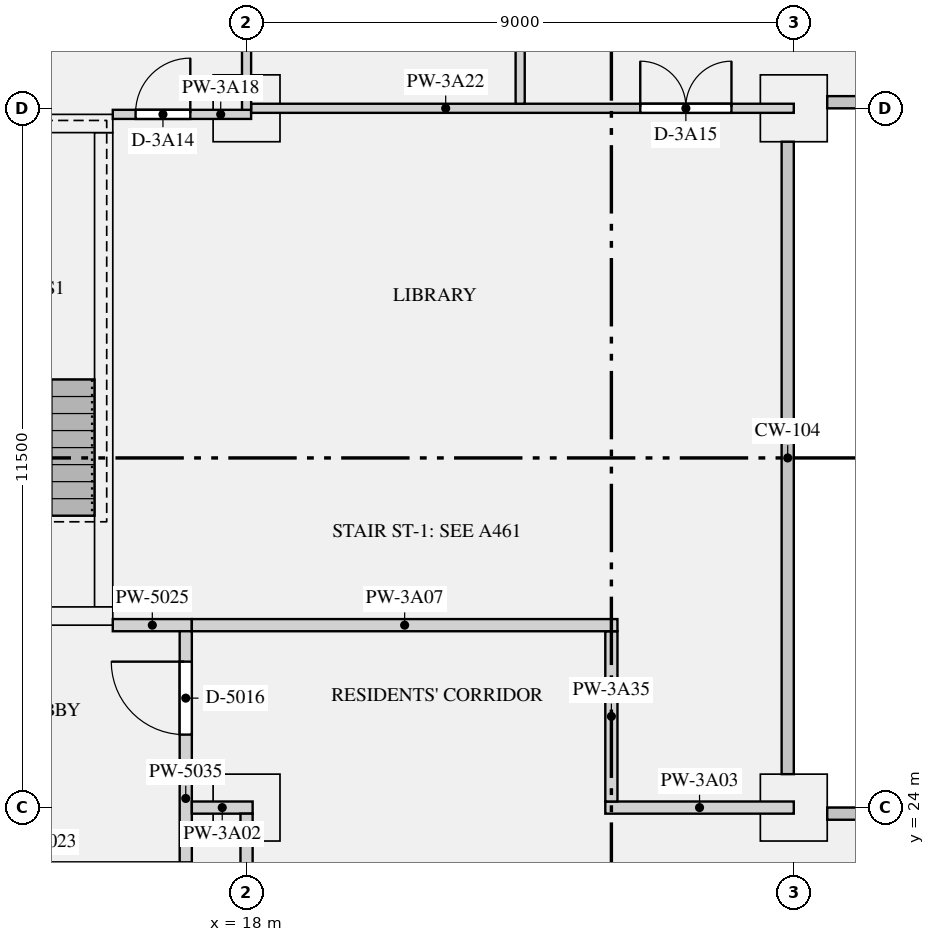
"""IFC4 building model, lengths in metres.
Left out: names, types, materials, properties, quantities, classifications, styles, units other than length and angle.
Written with IfcOpenShell. Run it as: python <this file> out.ifc"""

import sys

from ifc_helpers import new_model, si_unit, direction, frame, frame_2d, origin, origin_2d, place, context, subcontext, project, spatial, rectangle, extrude, element, fill, save


model = new_model("IFC4")
c1 = context("Model", 3, precision=1e-05, world=origin(), true_north=direction((0.0, 1.0)))
c2 = subcontext(c1, "Body", "Model", "MODEL_VIEW")
j1 = project(units=[si_unit("LENGTHUNIT", "METRE"), si_unit("PLANEANGLEUNIT", "RADIAN")], contexts=[c1])
p1 = place(None, origin())
s1 = spatial("IfcSite", under=j1, at=p1, CompositionType="ELEMENT")
p2 = place(p1, origin())
s2 = spatial("IfcBuilding", under=s1, at=p2, CompositionType="ELEMENT")
p3 = place(p2, frame((0.0, 0.0, 141.3)))
s3 = spatial("IfcBuildingStorey", under=s2, at=p3, CompositionType="ELEMENT", Elevation=141.3)
for number, where, z_axis, x_axis in (
    (1, (18.0, 24.0, 0.0), (0.0, 0.0, 1.0), (1.0, 0.0, 0.0)),
    (2, (27.0, 24.0, 0.0), (0.0, 0.0, 1.0), (1.0, 0.0, 0.0)),
    (3, (18.0, 35.5, 0.0), (0.0, 0.0, 1.0), (1.0, 0.0, 0.0)),
    (4, (27.0, 35.5, 0.0), (0.0, 0.0, 1.0), (1.0, 0.0, 0.0)),
):
    element("IfcColumn", number, at=place(p3, frame(where, z_axis=z_axis, x_axis=x_axis)), inside=s3, PredefinedType="COLUMN", context=c2, shape_type="SweptSolid", body=[
        extrude(rectangle(XDim=1.1, YDim=1.1, at=origin_2d()), origin(), (0.0, 0.0, 1.0), 3.15),
    ])
p4 = place(p3, frame((12.2, 27.15, 0.0), z_axis=(0.0, 0.0, 1.0), x_axis=(1.0, 0.0, 0.0)))
e5 = element("IfcWall", 5, at=p4, inside=s3, PredefinedType="SHEAR", context=c2, shape_type="SweptSolid", body=[
    extrude(rectangle(XDim=3.6, YDim=0.3, at=frame_2d((1.8, 0.0))), origin(), (0.0, 0.0, 1.0), 3.15),
])
p5 = place(p4, frame((1.25, 0.0, 0.0)))
e6 = element("IfcOpeningElement", 6, at=p5, cuts=e5, PredefinedType="OPENING", context=c2, shape_type="SweptSolid", body=[
    extrude(rectangle(XDim=1.1, YDim=2.1, at=frame_2d((0.55, 1.05))), frame((0.0, 0.16, 0.0), z_axis=(0.0, -1.0, 0.0), x_axis=(1.0, 0.0, 0.0)), (0.0, 0.0, 1.0), 0.32),
])
p6 = place(p3, frame((12.2, 35.25, 0.0), z_axis=(0.0, 0.0, 1.0), x_axis=(1.0, 0.0, 0.0)))
e7 = element("IfcWall", 7, at=p6, inside=s3, PredefinedType="SHEAR", context=c2, shape_type="SweptSolid", body=[
    extrude(rectangle(XDim=3.6, YDim=0.3, at=frame_2d((1.8, 0.0))), origin(), (0.0, 0.0, 1.0), 3.15),
])
p7 = place(p3, frame((15.65, 27.3, 0.0), z_axis=(0.0, 0.0, 1.0), x_axis=(0.0, 1.0, 0.0)))
e8 = element("IfcWall", 8, at=p7, inside=s3, PredefinedType="SHEAR", context=c2, shape_type="SweptSolid", body=[
    extrude(rectangle(XDim=7.8, YDim=0.3, at=frame_2d((3.9, 0.0))), origin(), (0.0, 0.0, 1.0), 3.15),
])
p8 = place(p3, frame((15.8, 27.0, 0.0), z_axis=(0.0, 0.0, 1.0), x_axis=(1.0, 0.0, 0.0)))
e9 = element("IfcWall", 9, at=p8, inside=s3, PredefinedType="PARTITIONING", context=c2, shape_type="SweptSolid", body=[
    extrude(rectangle(XDim=1.3, YDim=0.2, at=frame_2d((0.65, 0.0))), origin(), (0.0, 0.0, 1.0), 2.83),
])
p9 = place(p3, frame((17.0, 23.1, 0.0), z_axis=(0.0, 0.0, 1.0), x_axis=(0.0, 1.0, 0.0)))
e10 = element("IfcWall", 10, at=p9, inside=s3, PredefinedType="PARTITIONING", context=c2, shape_type="SweptSolid", body=[
    extrude(rectangle(XDim=3.8, YDim=0.2, at=frame_2d((1.9, 0.0))), origin(), (0.0, 0.0, 1.0), 2.83),
])
p10 = place(p9, frame((2.1, 0.0, 0.0)))
e11 = element("IfcOpeningElement", 11, at=p10, cuts=e10, PredefinedType="OPENING", context=c2, shape_type="SweptSolid", body=[
    extrude(rectangle(XDim=1.2, YDim=2.1, at=frame_2d((0.6, 1.05))), frame((0.0, 0.11, 0.0), z_axis=(0.0, -1.0, 0.0), x_axis=(1.0, 0.0, 0.0)), (0.0, 0.0, 1.0), 0.22),
])
p11 = place(p3, frame((17.1, 24.0, 0.0), z_axis=(0.0, 0.0, 1.0), x_axis=(1.0, 0.0, 0.0)))
e12 = element("IfcWall", 12, at=p11, inside=s3, PredefinedType="PARTITIONING", context=c2, shape_type="SweptSolid", body=[
    extrude(rectangle(XDim=1.0, YDim=0.2, at=frame_2d((0.5, 0.0))), origin(), (0.0, 0.0, 1.0), 2.83),
])
p12 = place(p3, frame((23.9, 24.0, 0.0), z_axis=(0.0, 0.0, 1.0), x_axis=(1.0, 0.0, 0.0)))
e13 = element("IfcWall", 13, at=p12, inside=s3, PredefinedType="PARTITIONING", context=c2, shape_type="SweptSolid", body=[
    extrude(rectangle(XDim=3.1, YDim=0.2, at=frame_2d((1.55, 0.0))), origin(), (0.0, 0.0, 1.0), 2.83),
])
p13 = place(p3, frame((17.1, 27.0, 0.0), z_axis=(0.0, 0.0, 1.0), x_axis=(1.0, 0.0, 0.0)))
e14 = element("IfcWall", 14, at=p13, inside=s3, PredefinedType="PARTITIONING", context=c2, shape_type="SweptSolid", body=[
    extrude(rectangle(XDim=7.0, YDim=0.2, at=frame_2d((3.5, 0.0))), origin(), (0.0, 0.0, 1.0), 2.83),
])
p14 = place(p3, frame((15.8, 35.4, 0.0), z_axis=(0.0, 0.0, 1.0), x_axis=(1.0, 0.0, 0.0)))
e15 = element("IfcWall", 15, at=p14, inside=s3, PredefinedType="PARTITIONING", context=c2, shape_type="SweptSolid", body=[
    extrude(rectangle(XDim=2.275, YDim=0.15, at=frame_2d((1.137, 0.0))), origin(), (0.0, 0.0, 1.0), 2.83),
])
p15 = place(p14, frame((0.375, 0.0, 0.0)))
e16 = element("IfcOpeningElement", 16, at=p15, cuts=e15, PredefinedType="OPENING", context=c2, shape_type="SweptSolid", body=[
    extrude(rectangle(XDim=0.9, YDim=2.1, at=frame_2d((0.45, 1.05))), frame((0.0, 0.085, 0.0), z_axis=(0.0, -1.0, 0.0), x_axis=(1.0, 0.0, 0.0)), (0.0, 0.0, 1.0), 0.17),
])
p16 = place(p3, frame((18.075, 35.5, 0.0), z_axis=(0.0, 0.0, 1.0), x_axis=(1.0, 0.0, 0.0)))
e17 = element("IfcWall", 17, at=p16, inside=s3, PredefinedType="PARTITIONING", context=c2, shape_type="SweptSolid", body=[
    extrude(rectangle(XDim=8.925, YDim=0.15, at=frame_2d((4.462, 0.0))), origin(), (0.0, 0.0, 1.0), 2.83),
])
p17 = place(p16, frame((6.4, 0.0, 0.0)))
e18 = element("IfcOpeningElement", 18, at=p17, cuts=e17, PredefinedType="OPENING", context=c2, shape_type="SweptSolid", body=[
    extrude(rectangle(XDim=1.5, YDim=2.1, at=frame_2d((0.75, 1.05))), frame((0.0, 0.085, 0.0), z_axis=(0.0, -1.0, 0.0), x_axis=(1.0, 0.0, 0.0)), (0.0, 0.0, 1.0), 0.17),
])
p18 = place(p3, frame((18.0, 35.475, 0.0), z_axis=(0.0, 0.0, 1.0), x_axis=(0.0, 1.0, 0.0)))
e19 = element("IfcWall", 19, at=p18, inside=s3, PredefinedType="PARTITIONING", context=c2, shape_type="SweptSolid", body=[
    extrude(rectangle(XDim=7.325, YDim=0.15, at=frame_2d((3.663, 0.0))), origin(), (0.0, 0.0, 1.0), 2.83),
])
p19 = place(p18, frame((5.05, 0.0, 0.0)))
e20 = element("IfcOpeningElement", 20, at=p19, cuts=e19, PredefinedType="OPENING", context=c2, shape_type="SweptSolid", body=[
    extrude(rectangle(XDim=0.9, YDim=2.1, at=frame_2d((0.45, 1.05))), frame((0.0, 0.085, 0.0), z_axis=(0.0, -1.0, 0.0), x_axis=(1.0, 0.0, 0.0)), (0.0, 0.0, 1.0), 0.17),
])
p20 = place(p18, frame((1.6, 0.0, 0.0)))
e21 = element("IfcOpeningElement", 21, at=p20, cuts=e19, PredefinedType="OPENING", context=c2, shape_type="SweptSolid", body=[
    extrude(rectangle(XDim=0.9, YDim=2.1, at=frame_2d((0.45, 1.05))), frame((0.0, 0.085, 0.0), z_axis=(0.0, -1.0, 0.0), x_axis=(1.0, 0.0, 0.0)), (0.0, 0.0, 1.0), 0.17),
])
p21 = place(p3, frame((18.0, 16.1, 0.0), z_axis=(0.0, 0.0, 1.0), x_axis=(0.0, 1.0, 0.0)))
e22 = element("IfcWall", 22, at=p21, inside=s3, PredefinedType="PARTITIONING", context=c2, shape_type="SweptSolid", body=[
    extrude(rectangle(XDim=7.8, YDim=0.2, at=frame_2d((3.9, 0.0))), origin(), (0.0, 0.0, 1.0), 2.83),
])
p22 = place(p21, frame((1.85, 0.0, 0.0)))
e23 = element("IfcOpeningElement", 23, at=p22, cuts=e22, PredefinedType="OPENING", context=c2, shape_type="SweptSolid", body=[
    extrude(rectangle(XDim=1.1, YDim=2.1, at=frame_2d((0.55, 1.05))), frame((0.0, 0.11, 0.0), z_axis=(0.0, -1.0, 0.0), x_axis=(1.0, 0.0, 0.0)), (0.0, 0.0, 1.0), 0.22),
])
p23 = place(p3, frame((24.0, 24.1, 0.0), z_axis=(0.0, 0.0, 1.0), x_axis=(0.0, 1.0, 0.0)))
e24 = element("IfcWall", 24, at=p23, inside=s3, PredefinedType="PARTITIONING", context=c2, shape_type="SweptSolid", body=[
    extrude(rectangle(XDim=2.8, YDim=0.2, at=frame_2d((1.4, 0.0))), origin(), (0.0, 0.0, 1.0), 2.83),
])
p24 = place(p3, frame((22.5, 35.575, 0.0), z_axis=(0.0, 0.0, 1.0), x_axis=(0.0, 1.0, 0.0)))
e25 = element("IfcWall", 25, at=p24, inside=s3, PredefinedType="PARTITIONING", context=c2, shape_type="SweptSolid", body=[
    extrude(rectangle(XDim=7.225, YDim=0.15, at=frame_2d((3.613, 0.0))), origin(), (0.0, 0.0, 1.0), 2.83),
])
p25 = place(p10, origin())
e26 = element("IfcDoor", 26, at=p25, inside=s3, OperationType="SINGLE_SWING_RIGHT", PredefinedType="DOOR", context=c2, shape_type="SweptSolid", body=[
    extrude(rectangle(XDim=1.2, YDim=2.1, at=frame_2d((0.6, 1.05))), frame((0.0, 0.025, 0.0), z_axis=(0.0, -1.0, 0.0), x_axis=(1.0, 0.0, 0.0)), (0.0, 0.0, 1.0), 0.05),
])
fill(e11, e26)
p26 = place(p15, origin())
e27 = element("IfcDoor", 27, at=p26, inside=s3, OperationType="SINGLE_SWING_RIGHT", PredefinedType="DOOR", context=c2, shape_type="SweptSolid", body=[
    extrude(rectangle(XDim=0.9, YDim=2.1, at=frame_2d((0.45, 1.05))), frame((0.0, 0.025, 0.0), z_axis=(0.0, -1.0, 0.0), x_axis=(1.0, 0.0, 0.0)), (0.0, 0.0, 1.0), 0.05),
])
fill(e16, e27)
p27 = place(p17, origin())
e28 = element("IfcDoor", 28, at=p27, inside=s3, OperationType="DOUBLE_DOOR_SINGLE_SWING", PredefinedType="DOOR", context=c2, shape_type="SweptSolid", body=[
    extrude(rectangle(XDim=1.5, YDim=2.1, at=frame_2d((0.75, 1.05))), frame((0.0, 0.025, 0.0), z_axis=(0.0, -1.0, 0.0), x_axis=(1.0, 0.0, 0.0)), (0.0, 0.0, 1.0), 0.05),
])
fill(e18, e28)
save(model, sys.argv[1])
